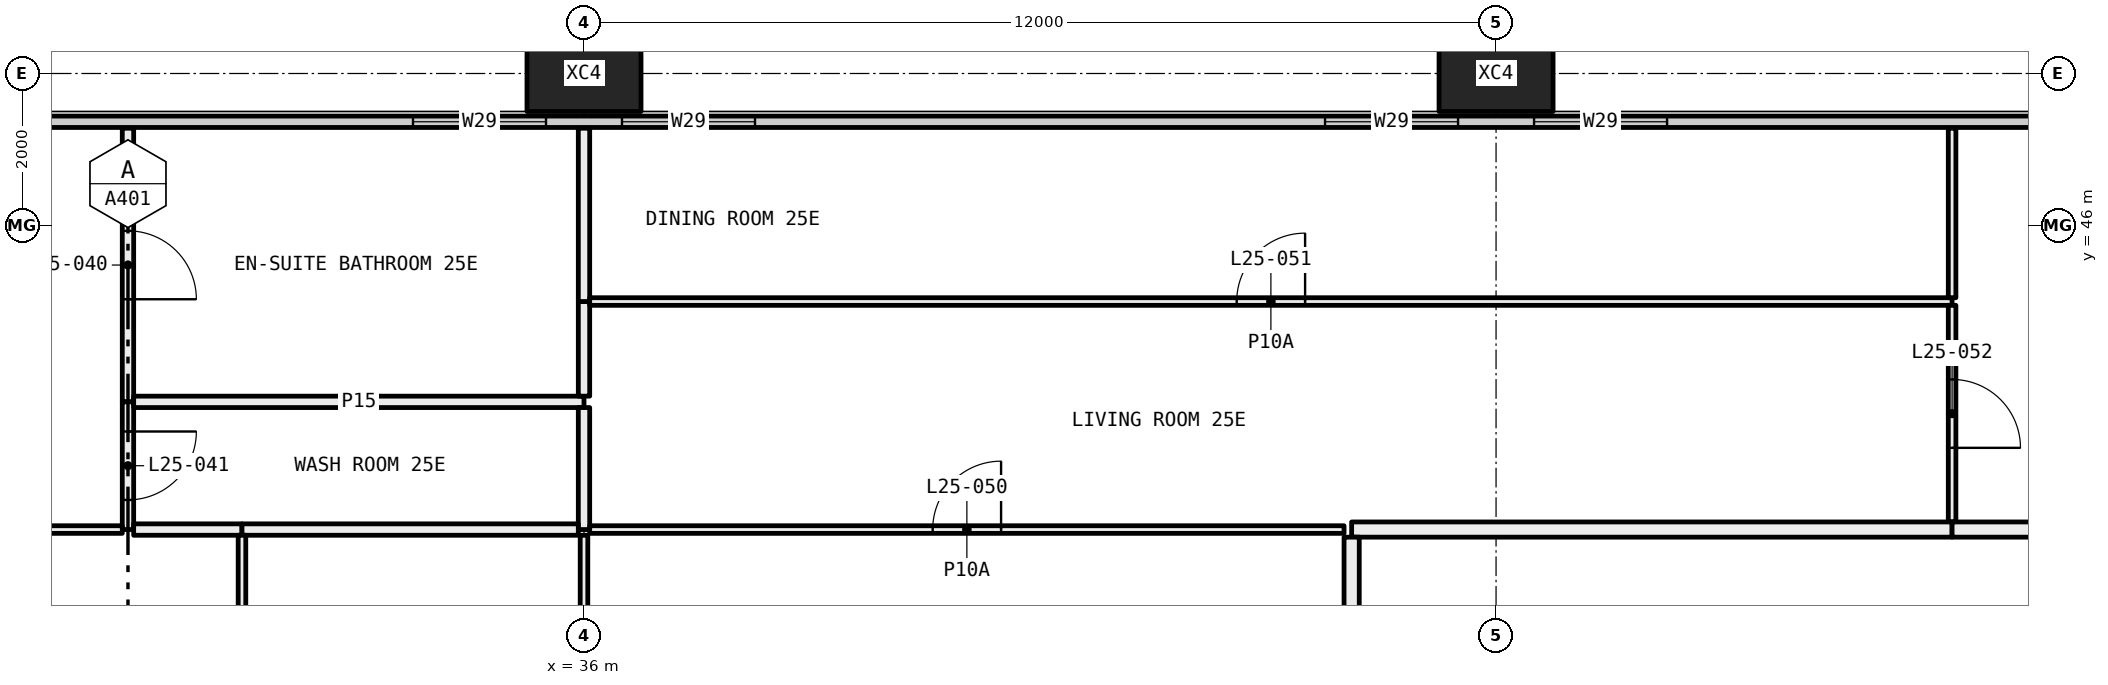
"""IFC4 building model, lengths in metres.
Left out: names, types, materials, properties, quantities, classifications, styles, units other than length and angle.
Written with IfcOpenShell. Run it as: python <this file> out.ifc"""

import sys

from ifc_helpers import new_model, si_unit, direction, frame, frame_2d, origin, origin_2d, place, context, subcontext, project, spatial, rectangle, hollow_rectangle, extrude, element, fill, save


model = new_model("IFC4")
c1 = context("Model", 3, precision=1e-05, world=origin(), true_north=direction((0.0, 1.0)))
c2 = subcontext(c1, "Body", "Model", "MODEL_VIEW")
j1 = project(units=[si_unit("LENGTHUNIT", "METRE"), si_unit("PLANEANGLEUNIT", "RADIAN")], contexts=[c1])
p1 = place(None, origin())
s1 = spatial("IfcSite", under=j1, at=p1, CompositionType="ELEMENT")
p2 = place(p1, origin())
s2 = spatial("IfcBuilding", under=s1, at=p2, CompositionType="ELEMENT")
p3 = place(p2, frame((0.0, 0.0, 100.05)))
s3 = spatial("IfcBuildingStorey", under=s2, at=p3, CompositionType="ELEMENT", Elevation=100.05)
for number, where, z_axis, x_axis in (
    (1, (36.0, 48.0, -0.4), (0.0, 0.0, 1.0), (1.0, 0.0, 0.0)),
    (2, (48.0, 48.0, -0.4), (0.0, 0.0, 1.0), (1.0, 0.0, 0.0)),
):
    element("IfcColumn", number, at=place(p3, frame(where, z_axis=z_axis, x_axis=x_axis)), inside=s3, PredefinedType="COLUMN", context=c2, shape_type="SweptSolid", body=[
        extrude(hollow_rectangle(XDim=1.5, YDim=1.0, WallThickness=0.06, at=origin_2d()), origin(), (0.0, 0.0, 1.0), 3.45),
    ])
p4 = place(p3, frame((6.56, 47.365, 0.0), z_axis=(0.0, 0.0, 1.0), x_axis=(1.0, 0.0, 0.0)))
e3 = element("IfcWall", 3, at=p4, inside=s3, PredefinedType="ELEMENTEDWALL", context=c2, shape_type="SweptSolid", body=[
    extrude(rectangle(XDim=58.88, YDim=0.15, at=frame_2d((29.44, 0.0))), origin(), (0.0, 0.0, 1.0), 3.05),
])
p5 = place(p4, frame((0.44, 0.0, 0.45)))
e4 = element("IfcOpeningElement", 4, at=p5, cuts=e3, PredefinedType="OPENING", context=c2, shape_type="SweptSolid", body=[
    extrude(rectangle(XDim=4.5, YDim=2.55, at=frame_2d((2.25, 1.275))), frame((0.0, 0.085, 0.0), z_axis=(0.0, -1.0, 0.0), x_axis=(1.0, 0.0, 0.0)), (0.0, 0.0, 1.0), 0.17),
])
p6 = place(p4, frame((5.94, 0.0, 0.45)))
e5 = element("IfcOpeningElement", 5, at=p6, cuts=e3, PredefinedType="OPENING", context=c2, shape_type="SweptSolid", body=[
    extrude(rectangle(XDim=1.75, YDim=2.55, at=frame_2d((0.875, 1.275))), frame((0.0, 0.085, 0.0), z_axis=(0.0, -1.0, 0.0), x_axis=(1.0, 0.0, 0.0)), (0.0, 0.0, 1.0), 0.17),
])
p7 = place(p4, frame((15.19, 0.0, 0.45)))
e6 = element("IfcOpeningElement", 6, at=p7, cuts=e3, PredefinedType="OPENING", context=c2, shape_type="SweptSolid", body=[
    extrude(rectangle(XDim=1.75, YDim=2.55, at=frame_2d((0.875, 1.275))), frame((0.0, 0.085, 0.0), z_axis=(0.0, -1.0, 0.0), x_axis=(1.0, 0.0, 0.0)), (0.0, 0.0, 1.0), 0.17),
])
p8 = place(p4, frame((17.94, 0.0, 0.45)))
e7 = element("IfcOpeningElement", 7, at=p8, cuts=e3, PredefinedType="OPENING", context=c2, shape_type="SweptSolid", body=[
    extrude(rectangle(XDim=1.75, YDim=2.55, at=frame_2d((0.875, 1.275))), frame((0.0, 0.085, 0.0), z_axis=(0.0, -1.0, 0.0), x_axis=(1.0, 0.0, 0.0)), (0.0, 0.0, 1.0), 0.17),
])
p9 = place(p4, frame((27.19, 0.0, 0.45)))
e8 = element("IfcOpeningElement", 8, at=p9, cuts=e3, PredefinedType="OPENING", context=c2, shape_type="SweptSolid", body=[
    extrude(rectangle(XDim=1.75, YDim=2.55, at=frame_2d((0.875, 1.275))), frame((0.0, 0.085, 0.0), z_axis=(0.0, -1.0, 0.0), x_axis=(1.0, 0.0, 0.0)), (0.0, 0.0, 1.0), 0.17),
])
p10 = place(p4, frame((29.94, 0.0, 0.45)))
e9 = element("IfcOpeningElement", 9, at=p10, cuts=e3, PredefinedType="OPENING", context=c2, shape_type="SweptSolid", body=[
    extrude(rectangle(XDim=1.75, YDim=2.55, at=frame_2d((0.875, 1.275))), frame((0.0, 0.085, 0.0), z_axis=(0.0, -1.0, 0.0), x_axis=(1.0, 0.0, 0.0)), (0.0, 0.0, 1.0), 0.17),
])
p11 = place(p4, frame((39.19, 0.0, 0.45)))
e10 = element("IfcOpeningElement", 10, at=p11, cuts=e3, PredefinedType="OPENING", context=c2, shape_type="SweptSolid", body=[
    extrude(rectangle(XDim=1.75, YDim=2.55, at=frame_2d((0.875, 1.275))), frame((0.0, 0.085, 0.0), z_axis=(0.0, -1.0, 0.0), x_axis=(1.0, 0.0, 0.0)), (0.0, 0.0, 1.0), 0.17),
])
p12 = place(p4, frame((41.94, 0.0, 0.45)))
e11 = element("IfcOpeningElement", 11, at=p12, cuts=e3, PredefinedType="OPENING", context=c2, shape_type="SweptSolid", body=[
    extrude(rectangle(XDim=1.75, YDim=2.55, at=frame_2d((0.875, 1.275))), frame((0.0, 0.085, 0.0), z_axis=(0.0, -1.0, 0.0), x_axis=(1.0, 0.0, 0.0)), (0.0, 0.0, 1.0), 0.17),
])
p13 = place(p4, frame((51.19, 0.0, 0.45)))
e12 = element("IfcOpeningElement", 12, at=p13, cuts=e3, PredefinedType="OPENING", context=c2, shape_type="SweptSolid", body=[
    extrude(rectangle(XDim=1.75, YDim=2.55, at=frame_2d((0.875, 1.275))), frame((0.0, 0.085, 0.0), z_axis=(0.0, -1.0, 0.0), x_axis=(1.0, 0.0, 0.0)), (0.0, 0.0, 1.0), 0.17),
])
p14 = place(p4, frame((53.94, 0.0, 0.45)))
e13 = element("IfcOpeningElement", 13, at=p14, cuts=e3, PredefinedType="OPENING", context=c2, shape_type="SweptSolid", body=[
    extrude(rectangle(XDim=4.5, YDim=2.55, at=frame_2d((2.25, 1.275))), frame((0.0, 0.085, 0.0), z_axis=(0.0, -1.0, 0.0), x_axis=(1.0, 0.0, 0.0)), (0.0, 0.0, 1.0), 0.17),
])
p15 = place(p3, frame((30.0, 43.68, 0.0), z_axis=(0.0, 0.0, 1.0), x_axis=(0.0, 1.0, 0.0)))
e14 = element("IfcWall", 14, at=p15, inside=s3, PredefinedType="PARTITIONING", context=c2, shape_type="SweptSolid", body=[
    extrude(rectangle(XDim=3.6, YDim=0.15, at=frame_2d((1.8, 0.0))), origin(), (0.0, 0.0, 1.0), 3.05),
])
p16 = place(p15, frame((1.35, 0.0, 0.0)))
e15 = element("IfcOpeningElement", 15, at=p16, cuts=e14, PredefinedType="OPENING", context=c2, shape_type="SweptSolid", body=[
    extrude(rectangle(XDim=0.9, YDim=2.1, at=frame_2d((0.45, 1.05))), frame((0.0, 0.085, 0.0), z_axis=(0.0, -1.0, 0.0), x_axis=(1.0, 0.0, 0.0)), (0.0, 0.0, 1.0), 0.17),
])
p17 = place(p3, frame((30.0, 42.0, 0.0), z_axis=(0.0, 0.0, 1.0), x_axis=(0.0, 1.0, 0.0)))
e16 = element("IfcWall", 16, at=p17, inside=s3, PredefinedType="PARTITIONING", context=c2, shape_type="SweptSolid", body=[
    extrude(rectangle(XDim=1.68, YDim=0.15, at=frame_2d((0.84, 0.0))), origin(), (0.0, 0.0, 1.0), 3.05),
])
p18 = place(p17, frame((0.39, 0.0, 0.0)))
e17 = element("IfcOpeningElement", 17, at=p18, cuts=e16, PredefinedType="OPENING", context=c2, shape_type="SweptSolid", body=[
    extrude(rectangle(XDim=0.9, YDim=2.1, at=frame_2d((0.45, 1.05))), frame((0.0, 0.085, 0.0), z_axis=(0.0, -1.0, 0.0), x_axis=(1.0, 0.0, 0.0)), (0.0, 0.0, 1.0), 0.17),
])
p19 = place(p3, frame((26.0, 42.0, 0.0), z_axis=(0.0, 0.0, 1.0), x_axis=(1.0, 0.0, 0.0)))
e18 = element("IfcWall", 18, at=p19, inside=s3, PredefinedType="PARTITIONING", context=c2, shape_type="SweptSolid", body=[
    extrude(rectangle(XDim=3.925, YDim=0.1, at=frame_2d((1.962, 0.0))), origin(), (0.0, 0.0, 1.0), 3.05),
])
p20 = place(p19, frame((1.512, 0.0, 0.0)))
e19 = element("IfcOpeningElement", 19, at=p20, cuts=e18, PredefinedType="OPENING", context=c2, shape_type="SweptSolid", body=[
    extrude(rectangle(XDim=0.9, YDim=2.1, at=frame_2d((0.45, 1.05))), frame((0.0, 0.06, 0.0), z_axis=(0.0, -1.0, 0.0), x_axis=(1.0, 0.0, 0.0)), (0.0, 0.0, 1.0), 0.12),
])
p21 = place(p3, frame((30.075, 43.68, 0.0), z_axis=(0.0, 0.0, 1.0), x_axis=(1.0, 0.0, 0.0)))
e20 = element("IfcWall", 20, at=p21, inside=s3, PredefinedType="PARTITIONING", context=c2, shape_type="SweptSolid", body=[
    extrude(rectangle(XDim=5.925, YDim=0.15, at=frame_2d((2.962, 0.0))), origin(), (0.0, 0.0, 1.0), 2.45),
])
p22 = place(p3, frame((36.0, 43.755, 0.0), z_axis=(0.0, 0.0, 1.0), x_axis=(0.0, 1.0, 0.0)))
e21 = element("IfcWall", 21, at=p22, inside=s3, PredefinedType="PARTITIONING", context=c2, shape_type="SweptSolid", body=[
    extrude(rectangle(XDim=1.245, YDim=0.15, at=frame_2d((0.623, 0.0))), origin(), (0.0, 0.0, 1.0), 2.45),
])
p23 = place(p3, frame((36.0, 45.0, 0.0), z_axis=(0.0, 0.0, 1.0), x_axis=(0.0, 1.0, 0.0)))
e22 = element("IfcWall", 22, at=p23, inside=s3, PredefinedType="PARTITIONING", context=c2, shape_type="SweptSolid", body=[
    extrude(rectangle(XDim=2.28, YDim=0.15, at=frame_2d((1.14, 0.0))), origin(), (0.0, 0.0, 1.0), 2.45),
])
p24 = place(p3, frame((36.0, 42.0, 0.0), z_axis=(0.0, 0.0, 1.0), x_axis=(0.0, 1.0, 0.0)))
e23 = element("IfcWall", 23, at=p24, inside=s3, PredefinedType="PARTITIONING", context=c2, shape_type="SweptSolid", body=[
    extrude(rectangle(XDim=1.605, YDim=0.15, at=frame_2d((0.802, 0.0))), origin(), (0.0, 0.0, 1.0), 2.45),
])
p25 = place(p3, frame((30.075, 42.0, 0.0), z_axis=(0.0, 0.0, 1.0), x_axis=(1.0, 0.0, 0.0)))
e24 = element("IfcWall", 24, at=p25, inside=s3, PredefinedType="PARTITIONING", context=c2, shape_type="SweptSolid", body=[
    extrude(rectangle(XDim=1.425, YDim=0.15, at=frame_2d((0.712, 0.0))), origin(), (0.0, 0.0, 1.0), 3.05),
])
p26 = place(p3, frame((31.5, 42.0, 0.0), z_axis=(0.0, 0.0, 1.0), x_axis=(1.0, 0.0, 0.0)))
e25 = element("IfcWall", 25, at=p26, inside=s3, PredefinedType="PARTITIONING", context=c2, shape_type="SweptSolid", body=[
    extrude(rectangle(XDim=4.425, YDim=0.15, at=frame_2d((2.212, 0.0))), origin(), (0.0, 0.0, 1.0), 2.45),
])
p27 = place(p3, frame((54.0, 45.0, 0.0), z_axis=(0.0, 0.0, 1.0), x_axis=(-1.0, 0.0, 0.0)))
e26 = element("IfcWall", 26, at=p27, inside=s3, PredefinedType="PARTITIONING", context=c2, shape_type="SweptSolid", body=[
    extrude(rectangle(XDim=17.925, YDim=0.1, at=frame_2d((8.962, 0.0))), origin(), (0.0, 0.0, 1.0), 2.45),
])
p28 = place(p27, frame((8.512, 0.0, 0.0)))
e27 = element("IfcOpeningElement", 27, at=p28, cuts=e26, PredefinedType="OPENING", context=c2, shape_type="SweptSolid", body=[
    extrude(rectangle(XDim=0.9, YDim=2.1, at=frame_2d((0.45, 1.05))), frame((0.0, 0.06, 0.0), z_axis=(0.0, -1.0, 0.0), x_axis=(1.0, 0.0, 0.0)), (0.0, 0.0, 1.0), 0.12),
])
p29 = place(p3, frame((54.0, 42.1, 0.0), z_axis=(0.0, 0.0, 1.0), x_axis=(0.0, 1.0, 0.0)))
e28 = element("IfcWall", 28, at=p29, inside=s3, PredefinedType="PARTITIONING", context=c2, shape_type="SweptSolid", body=[
    extrude(rectangle(XDim=2.85, YDim=0.1, at=frame_2d((1.425, 0.0))), origin(), (0.0, 0.0, 1.0), 3.05),
])
p30 = place(p29, frame((0.975, 0.0, 0.0)))
e29 = element("IfcOpeningElement", 29, at=p30, cuts=e28, PredefinedType="OPENING", context=c2, shape_type="SweptSolid", body=[
    extrude(rectangle(XDim=0.9, YDim=2.1, at=frame_2d((0.45, 1.05))), frame((0.0, 0.06, 0.0), z_axis=(0.0, -1.0, 0.0), x_axis=(1.0, 0.0, 0.0)), (0.0, 0.0, 1.0), 0.12),
])
p31 = place(p3, frame((36.075, 42.0, 0.0), z_axis=(0.0, 0.0, 1.0), x_axis=(1.0, 0.0, 0.0)))
e30 = element("IfcWall", 30, at=p31, inside=s3, PredefinedType="PARTITIONING", context=c2, shape_type="SweptSolid", body=[
    extrude(rectangle(XDim=9.925, YDim=0.1, at=frame_2d((4.962, 0.0))), origin(), (0.0, 0.0, 1.0), 2.45),
])
p32 = place(p31, frame((4.512, 0.0, 0.0)))
e31 = element("IfcOpeningElement", 31, at=p32, cuts=e30, PredefinedType="OPENING", context=c2, shape_type="SweptSolid", body=[
    extrude(rectangle(XDim=0.9, YDim=2.1, at=frame_2d((0.45, 1.05))), frame((0.0, 0.06, 0.0), z_axis=(0.0, -1.0, 0.0), x_axis=(1.0, 0.0, 0.0)), (0.0, 0.0, 1.0), 0.12),
])
p33 = place(p3, frame((46.1, 42.0, 0.0), z_axis=(0.0, 0.0, 1.0), x_axis=(1.0, 0.0, 0.0)))
e32 = element("IfcWall", 32, at=p33, inside=s3, PredefinedType="PARTITIONING", context=c2, shape_type="SweptSolid", body=[
    extrude(rectangle(XDim=7.9, YDim=0.2, at=frame_2d((3.95, 0.0))), origin(), (0.0, 0.0, 1.0), 3.05),
])
p34 = place(p3, frame((54.0, 45.05, 0.0), z_axis=(0.0, 0.0, 1.0), x_axis=(0.0, 1.0, 0.0)))
e33 = element("IfcWall", 33, at=p34, inside=s3, PredefinedType="PARTITIONING", context=c2, shape_type="SweptSolid", body=[
    extrude(rectangle(XDim=2.23, YDim=0.1, at=frame_2d((1.115, 0.0))), origin(), (0.0, 0.0, 1.0), 3.05),
])
p35 = place(p3, frame((54.0, 42.0, 0.0), z_axis=(0.0, 0.0, 1.0), x_axis=(1.0, 0.0, 0.0)))
e34 = element("IfcWall", 34, at=p35, inside=s3, PredefinedType="PARTITIONING", context=c2, shape_type="SweptSolid", body=[
    extrude(rectangle(XDim=6.0, YDim=0.2, at=frame_2d((3.0, 0.0))), origin(), (0.0, 0.0, 1.0), 3.05),
])
p36 = place(p3, frame((31.5, 36.1, 0.0), z_axis=(0.0, 0.0, 1.0), x_axis=(0.0, 1.0, 0.0)))
e35 = element("IfcWall", 35, at=p36, inside=s3, PredefinedType="PARTITIONING", context=c2, shape_type="SweptSolid", body=[
    extrude(rectangle(XDim=5.825, YDim=0.1, at=frame_2d((2.913, 0.0))), origin(), (0.0, 0.0, 1.0), 3.05),
])
p37 = place(p36, frame((2.462, 0.0, 0.0)))
e36 = element("IfcOpeningElement", 36, at=p37, cuts=e35, PredefinedType="OPENING", context=c2, shape_type="SweptSolid", body=[
    extrude(rectangle(XDim=0.9, YDim=2.1, at=frame_2d((0.45, 1.05))), frame((0.0, 0.06, 0.0), z_axis=(0.0, -1.0, 0.0), x_axis=(1.0, 0.0, 0.0)), (0.0, 0.0, 1.0), 0.12),
])
p38 = place(p3, frame((36.0, 36.75, 0.0), z_axis=(0.0, 0.0, 1.0), x_axis=(0.0, 1.0, 0.0)))
e37 = element("IfcWall", 37, at=p38, inside=s3, PredefinedType="PARTITIONING", context=c2, shape_type="SweptSolid", body=[
    extrude(rectangle(XDim=5.175, YDim=0.1, at=frame_2d((2.587, 0.0))), origin(), (0.0, 0.0, 1.0), 2.45),
])
p39 = place(p38, frame((2.137, 0.0, 0.0)))
e38 = element("IfcOpeningElement", 38, at=p39, cuts=e37, PredefinedType="OPENING", context=c2, shape_type="SweptSolid", body=[
    extrude(rectangle(XDim=0.9, YDim=2.1, at=frame_2d((0.45, 1.05))), frame((0.0, 0.06, 0.0), z_axis=(0.0, -1.0, 0.0), x_axis=(1.0, 0.0, 0.0)), (0.0, 0.0, 1.0), 0.12),
])
p40 = place(p3, frame((46.1, 36.1, 0.0), z_axis=(0.0, 0.0, 1.0), x_axis=(0.0, 1.0, 0.0)))
e39 = element("IfcWall", 39, at=p40, inside=s3, PredefinedType="PARTITIONING", context=c2, shape_type="SweptSolid", body=[
    extrude(rectangle(XDim=5.8, YDim=0.2, at=frame_2d((2.9, 0.0))), origin(), (0.0, 0.0, 1.0), 3.05),
])
p41 = place(p9, origin())
e40 = element("IfcWindow", 40, at=p41, inside=s3, PartitioningType="SINGLE_PANEL", PredefinedType="WINDOW", context=c2, shape_type="SweptSolid", body=[
    extrude(rectangle(XDim=1.75, YDim=2.55, at=frame_2d((0.875, 1.275))), frame((0.0, 0.03, 0.0), z_axis=(0.0, -1.0, 0.0), x_axis=(1.0, 0.0, 0.0)), (0.0, 0.0, 1.0), 0.06),
])
fill(e8, e40)
p42 = place(p10, origin())
e41 = element("IfcWindow", 41, at=p42, inside=s3, PartitioningType="SINGLE_PANEL", PredefinedType="WINDOW", context=c2, shape_type="SweptSolid", body=[
    extrude(rectangle(XDim=1.75, YDim=2.55, at=frame_2d((0.875, 1.275))), frame((0.0, 0.03, 0.0), z_axis=(0.0, -1.0, 0.0), x_axis=(1.0, 0.0, 0.0)), (0.0, 0.0, 1.0), 0.06),
])
fill(e9, e41)
p43 = place(p11, origin())
e42 = element("IfcWindow", 42, at=p43, inside=s3, PartitioningType="SINGLE_PANEL", PredefinedType="WINDOW", context=c2, shape_type="SweptSolid", body=[
    extrude(rectangle(XDim=1.75, YDim=2.55, at=frame_2d((0.875, 1.275))), frame((0.0, 0.03, 0.0), z_axis=(0.0, -1.0, 0.0), x_axis=(1.0, 0.0, 0.0)), (0.0, 0.0, 1.0), 0.06),
])
fill(e10, e42)
p44 = place(p12, origin())
e43 = element("IfcWindow", 43, at=p44, inside=s3, PartitioningType="SINGLE_PANEL", PredefinedType="WINDOW", context=c2, shape_type="SweptSolid", body=[
    extrude(rectangle(XDim=1.75, YDim=2.55, at=frame_2d((0.875, 1.275))), frame((0.0, 0.03, 0.0), z_axis=(0.0, -1.0, 0.0), x_axis=(1.0, 0.0, 0.0)), (0.0, 0.0, 1.0), 0.06),
])
fill(e11, e43)
p45 = place(p16, frame((0.9, 0.0, 0.0), x_axis=(-1.0, 0.0, 0.0)))
e44 = element("IfcDoor", 44, at=p45, inside=s3, OperationType="SINGLE_SWING_LEFT", PredefinedType="DOOR", context=c2, shape_type="SweptSolid", body=[
    extrude(rectangle(XDim=0.9, YDim=2.1, at=frame_2d((0.45, 1.05))), frame((0.0, 0.025, 0.0), z_axis=(0.0, -1.0, 0.0), x_axis=(1.0, 0.0, 0.0)), (0.0, 0.0, 1.0), 0.05),
])
fill(e15, e44)
p46 = place(p18, frame((0.9, 0.0, 0.0), x_axis=(-1.0, 0.0, 0.0)))
e45 = element("IfcDoor", 45, at=p46, inside=s3, OperationType="SINGLE_SWING_RIGHT", PredefinedType="DOOR", context=c2, shape_type="SweptSolid", body=[
    extrude(rectangle(XDim=0.9, YDim=2.1, at=frame_2d((0.45, 1.05))), frame((0.0, 0.025, 0.0), z_axis=(0.0, -1.0, 0.0), x_axis=(1.0, 0.0, 0.0)), (0.0, 0.0, 1.0), 0.05),
])
fill(e17, e45)
p47 = place(p32, origin())
e46 = element("IfcDoor", 46, at=p47, inside=s3, OperationType="SINGLE_SWING_LEFT", PredefinedType="DOOR", context=c2, shape_type="SweptSolid", body=[
    extrude(rectangle(XDim=0.9, YDim=2.1, at=frame_2d((0.45, 1.05))), frame((0.0, 0.025, 0.0), z_axis=(0.0, -1.0, 0.0), x_axis=(1.0, 0.0, 0.0)), (0.0, 0.0, 1.0), 0.05),
])
fill(e31, e46)
p48 = place(p28, frame((0.9, 0.0, 0.0), x_axis=(-1.0, 0.0, 0.0)))
e47 = element("IfcDoor", 47, at=p48, inside=s3, OperationType="SINGLE_SWING_LEFT", PredefinedType="DOOR", context=c2, shape_type="SweptSolid", body=[
    extrude(rectangle(XDim=0.9, YDim=2.1, at=frame_2d((0.45, 1.05))), frame((0.0, 0.025, 0.0), z_axis=(0.0, -1.0, 0.0), x_axis=(1.0, 0.0, 0.0)), (0.0, 0.0, 1.0), 0.05),
])
fill(e27, e47)
p49 = place(p30, frame((0.9, 0.0, 0.0), x_axis=(-1.0, 0.0, 0.0)))
e48 = element("IfcDoor", 48, at=p49, inside=s3, OperationType="SINGLE_SWING_LEFT", PredefinedType="DOOR", context=c2, shape_type="SweptSolid", body=[
    extrude(rectangle(XDim=0.9, YDim=2.1, at=frame_2d((0.45, 1.05))), frame((0.0, 0.025, 0.0), z_axis=(0.0, -1.0, 0.0), x_axis=(1.0, 0.0, 0.0)), (0.0, 0.0, 1.0), 0.05),
])
fill(e29, e48)
save(model, sys.argv[1])
